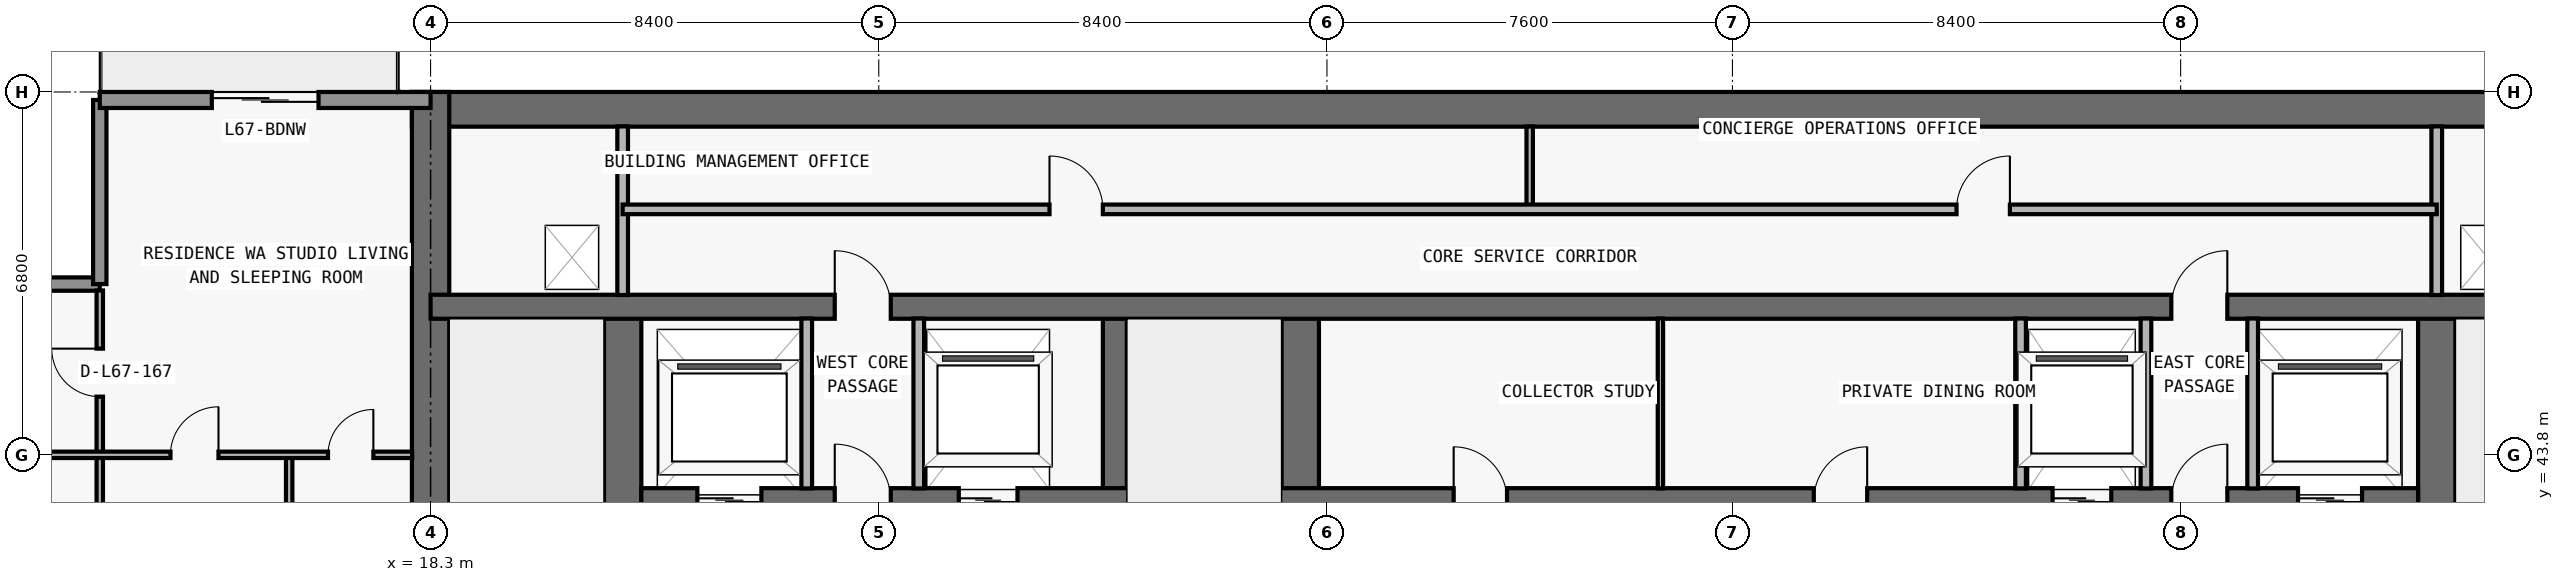
"""IFC4 building model, lengths in metres.
Left out: names, types, materials, properties, quantities, classifications, styles, units other than length and angle.
Written with IfcOpenShell. Run it as: python <this file> out.ifc"""

import sys

from ifc_helpers import new_model, si_unit, direction, frame, frame_2d, origin, place, context, subcontext, project, spatial, rectangle, extrude, element, fill, save


model = new_model("IFC4")
c1 = context("Model", 3, precision=1e-05, world=origin(), true_north=direction((0.0, 1.0)))
c2 = subcontext(c1, "Body", "Model", "MODEL_VIEW")
j1 = project(units=[si_unit("LENGTHUNIT", "METRE"), si_unit("PLANEANGLEUNIT", "RADIAN")], contexts=[c1])
p1 = place(None, origin())
s1 = spatial("IfcSite", under=j1, at=p1, CompositionType="ELEMENT")
p2 = place(p1, origin())
s2 = spatial("IfcBuilding", under=s1, at=p2, CompositionType="ELEMENT")
p3 = place(p2, frame((0.0, 0.0, 239.7)))
s3 = spatial("IfcBuildingStorey", under=s2, at=p3, CompositionType="ELEMENT", Elevation=239.7)
p4 = place(p3, frame((17.95, 50.275, 0.0), z_axis=(0.0, 0.0, 1.0), x_axis=(1.0, 0.0, 0.0)))
e1 = element("IfcWall", 1, at=p4, inside=s3, PredefinedType="SHEAR", context=c2, shape_type="SweptSolid", body=[
    extrude(rectangle(XDim=41.9, YDim=0.65, at=frame_2d((20.95, 0.0))), origin(), (0.0, 0.0, 1.0), 3.05),
])
p5 = place(p3, frame((18.3, 36.65, 0.0), z_axis=(0.0, 0.0, 1.0), x_axis=(0.0, 1.0, 0.0)))
e2 = element("IfcWall", 2, at=p5, inside=s3, PredefinedType="SHEAR", context=c2, shape_type="SweptSolid", body=[
    extrude(rectangle(XDim=13.95, YDim=0.7, at=frame_2d((6.975, 0.0))), origin(), (0.0, 0.0, 1.0), 3.05),
])
p6 = place(p3, frame((21.9, 37.0, 0.0), z_axis=(0.0, 0.0, 1.0), x_axis=(0.0, 1.0, 0.0)))
e3 = element("IfcWall", 3, at=p6, inside=s3, PredefinedType="SHEAR", context=c2, shape_type="SweptSolid", body=[
    extrude(rectangle(XDim=9.575, YDim=0.7, at=frame_2d((4.788, 0.0))), origin(), (0.0, 0.0, 1.0), 3.05),
])
p7 = place(p6, frame((0.55, 0.0, 0.0)))
e4 = element("IfcOpeningElement", 4, at=p7, cuts=e3, PredefinedType="OPENING", context=c2, shape_type="SweptSolid", body=[
    extrude(rectangle(XDim=1.1, YDim=2.15, at=frame_2d((0.55, 1.075))), frame((0.0, 0.36, 0.0), z_axis=(0.0, -1.0, 0.0), x_axis=(1.0, 0.0, 0.0)), (0.0, 0.0, 1.0), 0.72),
])
p8 = place(p3, frame((55.9, 37.0, 0.0), z_axis=(0.0, 0.0, 1.0), x_axis=(0.0, 1.0, 0.0)))
e5 = element("IfcWall", 5, at=p8, inside=s3, PredefinedType="SHEAR", context=c2, shape_type="SweptSolid", body=[
    extrude(rectangle(XDim=9.575, YDim=0.7, at=frame_2d((4.788, 0.0))), origin(), (0.0, 0.0, 1.0), 3.05),
])
p9 = place(p8, frame((0.55, 0.0, 0.0)))
e6 = element("IfcOpeningElement", 6, at=p9, cuts=e5, PredefinedType="OPENING", context=c2, shape_type="SweptSolid", body=[
    extrude(rectangle(XDim=1.1, YDim=2.15, at=frame_2d((0.55, 1.075))), frame((0.0, 0.36, 0.0), z_axis=(0.0, -1.0, 0.0), x_axis=(1.0, 0.0, 0.0)), (0.0, 0.0, 1.0), 0.72),
])
p10 = place(p3, frame((31.125, 37.0, 0.0), z_axis=(0.0, 0.0, 1.0), x_axis=(0.0, 1.0, 0.0)))
e7 = element("IfcWall", 7, at=p10, inside=s3, PredefinedType="SHEAR", context=c2, shape_type="SweptSolid", body=[
    extrude(rectangle(XDim=9.575, YDim=0.45, at=frame_2d((4.788, 0.0))), origin(), (0.0, 0.0, 1.0), 3.05),
])
p11 = place(p3, frame((34.6, 37.0, 0.0), z_axis=(0.0, 0.0, 1.0), x_axis=(0.0, 1.0, 0.0)))
e8 = element("IfcWall", 8, at=p11, inside=s3, PredefinedType="SHEAR", context=c2, shape_type="SweptSolid", body=[
    extrude(rectangle(XDim=9.575, YDim=0.7, at=frame_2d((4.788, 0.0))), origin(), (0.0, 0.0, 1.0), 3.05),
])
p12 = place(p3, frame((22.25, 42.95, 0.0), z_axis=(0.0, 0.0, 1.0), x_axis=(1.0, 0.0, 0.0)))
e9 = element("IfcWall", 9, at=p12, inside=s3, PredefinedType="SHEAR", context=c2, shape_type="SweptSolid", body=[
    extrude(rectangle(XDim=33.3, YDim=0.45, at=frame_2d((16.65, 0.0))), origin(), (0.0, 0.0, 1.0), 3.05),
])
p13 = place(p12, frame((1.05, 0.0, 0.0)))
e10 = element("IfcOpeningElement", 10, at=p13, cuts=e9, PredefinedType="OPENING", context=c2, shape_type="SweptSolid", body=[
    extrude(rectangle(XDim=1.2, YDim=2.2, at=frame_2d((0.6, 1.1))), frame((0.0, 0.235, 0.0), z_axis=(0.0, -1.0, 0.0), x_axis=(1.0, 0.0, 0.0)), (0.0, 0.0, 1.0), 0.47),
])
p14 = place(p12, frame((31.05, 0.0, 0.0)))
e11 = element("IfcOpeningElement", 11, at=p14, cuts=e9, PredefinedType="OPENING", context=c2, shape_type="SweptSolid", body=[
    extrude(rectangle(XDim=1.2, YDim=2.2, at=frame_2d((0.6, 1.1))), frame((0.0, 0.235, 0.0), z_axis=(0.0, -1.0, 0.0), x_axis=(1.0, 0.0, 0.0)), (0.0, 0.0, 1.0), 0.47),
])
p15 = place(p12, frame((26.45, 0.0, 0.0)))
e12 = element("IfcOpeningElement", 12, at=p15, cuts=e9, PredefinedType="OPENING", context=c2, shape_type="SweptSolid", body=[
    extrude(rectangle(XDim=1.1, YDim=2.2, at=frame_2d((0.55, 1.1))), frame((0.0, 0.235, 0.0), z_axis=(0.0, -1.0, 0.0), x_axis=(1.0, 0.0, 0.0)), (0.0, 0.0, 1.0), 0.47),
])
p16 = place(p12, frame((5.95, 0.0, 0.0)))
e13 = element("IfcOpeningElement", 13, at=p16, cuts=e9, PredefinedType="OPENING", context=c2, shape_type="SweptSolid", body=[
    extrude(rectangle(XDim=1.1, YDim=2.2, at=frame_2d((0.55, 1.1))), frame((0.0, 0.235, 0.0), z_axis=(0.0, -1.0, 0.0), x_axis=(1.0, 0.0, 0.0)), (0.0, 0.0, 1.0), 0.47),
])
p17 = place(p12, frame((3.625, 0.0, 0.0)))
e14 = element("IfcOpeningElement", 14, at=p17, cuts=e9, PredefinedType="OPENING", context=c2, shape_type="SweptSolid", body=[
    extrude(rectangle(XDim=1.05, YDim=2.15, at=frame_2d((0.525, 1.075))), frame((0.0, 0.235, 0.0), z_axis=(0.0, -1.0, 0.0), x_axis=(1.0, 0.0, 0.0)), (0.0, 0.0, 1.0), 0.47),
])
p18 = place(p12, frame((28.675, 0.0, 0.0)))
e15 = element("IfcOpeningElement", 15, at=p18, cuts=e9, PredefinedType="OPENING", context=c2, shape_type="SweptSolid", body=[
    extrude(rectangle(XDim=1.05, YDim=2.15, at=frame_2d((0.525, 1.075))), frame((0.0, 0.235, 0.0), z_axis=(0.0, -1.0, 0.0), x_axis=(1.0, 0.0, 0.0)), (0.0, 0.0, 1.0), 0.47),
])
p19 = place(p12, frame((15.225, 0.0, 0.0)))
e16 = element("IfcOpeningElement", 16, at=p19, cuts=e9, PredefinedType="OPENING", context=c2, shape_type="SweptSolid", body=[
    extrude(rectangle(XDim=1.0, YDim=2.2, at=frame_2d((0.5, 1.1))), frame((0.0, 0.235, 0.0), z_axis=(0.0, -1.0, 0.0), x_axis=(1.0, 0.0, 0.0)), (0.0, 0.0, 1.0), 0.47),
])
p20 = place(p12, frame((21.975, 0.0, 0.0)))
e17 = element("IfcOpeningElement", 17, at=p20, cuts=e9, PredefinedType="OPENING", context=c2, shape_type="SweptSolid", body=[
    extrude(rectangle(XDim=1.0, YDim=2.2, at=frame_2d((0.5, 1.1))), frame((0.0, 0.235, 0.0), z_axis=(0.0, -1.0, 0.0), x_axis=(1.0, 0.0, 0.0)), (0.0, 0.0, 1.0), 0.47),
])
p21 = place(p3, frame((18.3, 46.575, 0.0), z_axis=(0.0, 0.0, 1.0), x_axis=(1.0, 0.0, 0.0)))
e18 = element("IfcWall", 18, at=p21, inside=s3, PredefinedType="SHEAR", context=c2, shape_type="SweptSolid", body=[
    extrude(rectangle(XDim=41.2, YDim=0.45, at=frame_2d((20.6, 0.0))), origin(), (0.0, 0.0, 1.0), 3.05),
])
p22 = place(p21, frame((7.575, 0.0, 0.0)))
e19 = element("IfcOpeningElement", 19, at=p22, cuts=e18, PredefinedType="OPENING", context=c2, shape_type="SweptSolid", body=[
    extrude(rectangle(XDim=1.05, YDim=2.15, at=frame_2d((0.525, 1.075))), frame((0.0, 0.235, 0.0), z_axis=(0.0, -1.0, 0.0), x_axis=(1.0, 0.0, 0.0)), (0.0, 0.0, 1.0), 0.47),
])
p23 = place(p21, frame((32.625, 0.0, 0.0)))
e20 = element("IfcOpeningElement", 20, at=p23, cuts=e18, PredefinedType="OPENING", context=c2, shape_type="SweptSolid", body=[
    extrude(rectangle(XDim=1.05, YDim=2.15, at=frame_2d((0.525, 1.075))), frame((0.0, 0.235, 0.0), z_axis=(0.0, -1.0, 0.0), x_axis=(1.0, 0.0, 0.0)), (0.0, 0.0, 1.0), 0.47),
])
p24 = place(p3, frame((8.25, 47.0, 0.0), z_axis=(0.0, 0.0, 1.0), x_axis=(1.0, 0.0, 0.0)))
e21 = element("IfcWall", 21, at=p24, inside=s3, PredefinedType="ELEMENTEDWALL", context=c2, shape_type="SweptSolid", body=[
    extrude(rectangle(XDim=3.85, YDim=0.25, at=frame_2d((1.925, 0.0))), origin(), (0.0, 0.0, 1.0), 3.05),
])
p25 = place(p3, frame((12.1, 47.0, 0.0), z_axis=(0.0, 0.0, 1.0), x_axis=(0.0, 1.0, 0.0)))
e22 = element("IfcWall", 22, at=p25, inside=s3, PredefinedType="ELEMENTEDWALL", context=c2, shape_type="SweptSolid", body=[
    extrude(rectangle(XDim=3.45, YDim=0.25, at=frame_2d((1.725, 0.0))), origin(), (0.0, 0.0, 1.0), 3.05),
])
p26 = place(p3, frame((12.1, 50.45, 0.0), z_axis=(0.0, 0.0, 1.0), x_axis=(1.0, 0.0, 0.0)))
e23 = element("IfcWall", 23, at=p26, inside=s3, PredefinedType="STANDARD", context=c2, shape_type="SweptSolid", body=[
    extrude(rectangle(XDim=6.2, YDim=0.3, at=frame_2d((3.1, 0.0))), origin(), (0.0, 0.0, 1.0), 3.05),
])
p27 = place(p26, frame((2.1, 0.0, 0.0)))
e24 = element("IfcOpeningElement", 24, at=p27, cuts=e23, PredefinedType="OPENING", context=c2, shape_type="SweptSolid", body=[
    extrude(rectangle(XDim=2.0, YDim=2.3, at=frame_2d((1.0, 1.15))), frame((0.0, 0.16, 0.0), z_axis=(0.0, -1.0, 0.0), x_axis=(1.0, 0.0, 0.0)), (0.0, 0.0, 1.0), 0.32),
])
p28 = place(p3, frame((12.1, 37.005, 0.0), z_axis=(0.0, 0.0, 1.0), x_axis=(0.0, 1.0, 0.0)))
e25 = element("IfcWall", 25, at=p28, inside=s3, PredefinedType="PARTITIONING", context=c2, shape_type="SweptSolid", body=[
    extrude(rectangle(XDim=9.875, YDim=0.12, at=frame_2d((4.938, 0.0))), origin(), (0.0, 0.0, 1.0), 3.05),
])
p29 = place(p28, frame((2.948, 0.0, 0.0)))
e26 = element("IfcOpeningElement", 26, at=p29, cuts=e25, PredefinedType="OPENING", context=c2, shape_type="SweptSolid", body=[
    extrude(rectangle(XDim=0.9, YDim=2.15, at=frame_2d((0.45, 1.075))), frame((0.0, 0.07, 0.0), z_axis=(0.0, -1.0, 0.0), x_axis=(1.0, 0.0, 0.0)), (0.0, 0.0, 1.0), 0.14),
])
p30 = place(p28, frame((7.885, 0.0, 0.0)))
e27 = element("IfcOpeningElement", 27, at=p30, cuts=e25, PredefinedType="OPENING", context=c2, shape_type="SweptSolid", body=[
    extrude(rectangle(XDim=0.9, YDim=2.15, at=frame_2d((0.45, 1.075))), frame((0.0, 0.07, 0.0), z_axis=(0.0, -1.0, 0.0), x_axis=(1.0, 0.0, 0.0)), (0.0, 0.0, 1.0), 0.14),
])
p31 = place(p3, frame((15.65, 37.0, 0.0), z_axis=(0.0, 0.0, 1.0), x_axis=(0.0, 1.0, 0.0)))
e28 = element("IfcWall", 28, at=p31, inside=s3, PredefinedType="PARTITIONING", context=c2, shape_type="SweptSolid", body=[
    extrude(rectangle(XDim=6.8, YDim=0.12, at=frame_2d((3.4, 0.0))), origin(), (0.0, 0.0, 1.0), 3.05),
])
p32 = place(p31, frame((1.207, 0.0, 0.0)))
e29 = element("IfcOpeningElement", 29, at=p32, cuts=e28, PredefinedType="OPENING", context=c2, shape_type="SweptSolid", body=[
    extrude(rectangle(XDim=0.85, YDim=2.1, at=frame_2d((0.425, 1.05))), frame((0.0, 0.07, 0.0), z_axis=(0.0, -1.0, 0.0), x_axis=(1.0, 0.0, 0.0)), (0.0, 0.0, 1.0), 0.14),
])
p33 = place(p3, frame((21.9, 46.795, 0.0), z_axis=(0.0, 0.0, 1.0), x_axis=(0.0, 1.0, 0.0)))
e30 = element("IfcWall", 30, at=p33, inside=s3, PredefinedType="PARTITIONING", context=c2, shape_type="SweptSolid", body=[
    extrude(rectangle(XDim=3.16, YDim=0.2, at=frame_2d((1.58, 0.0))), origin(), (0.0, 0.0, 1.0), 3.05),
])
for number, where, z_axis, x_axis in (
    (31, (25.35, 43.17, 0.0), (0.0, 0.0, 1.0), (0.0, 1.0, 0.0)),
    (32, (27.45, 43.17, 0.0), (0.0, 0.0, 1.0), (0.0, 1.0, 0.0)),
):
    element("IfcWall", number, at=place(p3, frame(where, z_axis=z_axis, x_axis=x_axis)), inside=s3, PredefinedType="PARTITIONING", context=c2, shape_type="SweptSolid", body=[
        extrude(rectangle(XDim=3.185, YDim=0.2, at=frame_2d((1.593, 0.0))), origin(), (0.0, 0.0, 1.0), 3.05),
    ])
p34 = place(p3, frame((38.9, 48.4, 0.0), z_axis=(0.0, 0.0, 1.0), x_axis=(0.0, 1.0, 0.0)))
e33 = element("IfcWall", 33, at=p34, inside=s3, PredefinedType="PARTITIONING", context=c2, shape_type="SweptSolid", body=[
    extrude(rectangle(XDim=1.555, YDim=0.12, at=frame_2d((0.778, 0.0))), origin(), (0.0, 0.0, 1.0), 3.05),
])
p35 = place(p3, frame((41.35, 43.17, 0.0), z_axis=(0.0, 0.0, 1.0), x_axis=(0.0, 1.0, 0.0)))
e34 = element("IfcWall", 34, at=p35, inside=s3, PredefinedType="MOVABLE", context=c2, shape_type="SweptSolid", body=[
    extrude(rectangle(XDim=3.185, YDim=0.1, at=frame_2d((1.593, 0.0))), origin(), (0.0, 0.0, 1.0), 3.05),
])
for number, where, z_axis, x_axis in (
    (35, (48.1, 43.17, 0.0), (0.0, 0.0, 1.0), (0.0, 1.0, 0.0)),
    (36, (50.45, 43.17, 0.0), (0.0, 0.0, 1.0), (0.0, 1.0, 0.0)),
    (37, (52.45, 43.17, 0.0), (0.0, 0.0, 1.0), (0.0, 1.0, 0.0)),
):
    element("IfcWall", number, at=place(p3, frame(where, z_axis=z_axis, x_axis=x_axis)), inside=s3, PredefinedType="PARTITIONING", context=c2, shape_type="SweptSolid", body=[
        extrude(rectangle(XDim=3.185, YDim=0.2, at=frame_2d((1.593, 0.0))), origin(), (0.0, 0.0, 1.0), 3.05),
    ])
p36 = place(p3, frame((55.9, 46.795, 0.0), z_axis=(0.0, 0.0, 1.0), x_axis=(0.0, 1.0, 0.0)))
e38 = element("IfcWall", 38, at=p36, inside=s3, PredefinedType="PARTITIONING", context=c2, shape_type="SweptSolid", body=[
    extrude(rectangle(XDim=3.16, YDim=0.2, at=frame_2d((1.58, 0.0))), origin(), (0.0, 0.0, 1.0), 3.05),
])
p37 = place(p3, frame((8.395, 43.8, 0.0), z_axis=(0.0, 0.0, 1.0), x_axis=(1.0, 0.0, 0.0)))
e39 = element("IfcWall", 39, at=p37, inside=s3, PredefinedType="PARTITIONING", context=c2, shape_type="SweptSolid", body=[
    extrude(rectangle(XDim=9.56, YDim=0.12, at=frame_2d((4.78, 0.0))), origin(), (0.0, 0.0, 1.0), 2.418),
])
p38 = place(p37, frame((5.03, 0.0, 0.0)))
e40 = element("IfcOpeningElement", 40, at=p38, cuts=e39, PredefinedType="OPENING", context=c2, shape_type="SweptSolid", body=[
    extrude(rectangle(XDim=0.9, YDim=2.15, at=frame_2d((0.45, 1.075))), frame((0.0, 0.07, 0.0), z_axis=(0.0, -1.0, 0.0), x_axis=(1.0, 0.0, 0.0)), (0.0, 0.0, 1.0), 0.14),
])
p39 = place(p37, frame((7.982, 0.0, 0.0)))
e41 = element("IfcOpeningElement", 41, at=p39, cuts=e39, PredefinedType="OPENING", context=c2, shape_type="SweptSolid", body=[
    extrude(rectangle(XDim=0.85, YDim=2.1, at=frame_2d((0.425, 1.05))), frame((0.0, 0.07, 0.0), z_axis=(0.0, -1.0, 0.0), x_axis=(1.0, 0.0, 0.0)), (0.0, 0.0, 1.0), 0.14),
])
p40 = place(p3, frame((21.9, 48.4, 0.0), z_axis=(0.0, 0.0, 1.0), x_axis=(1.0, 0.0, 0.0)))
e42 = element("IfcWall", 42, at=p40, inside=s3, PredefinedType="PARTITIONING", context=c2, shape_type="SweptSolid", body=[
    extrude(rectangle(XDim=34.0, YDim=0.18, at=frame_2d((17.0, 0.0))), origin(), (0.0, 0.0, 1.0), 3.05),
])
p41 = place(p40, frame((8.0, 0.0, 0.0)))
e43 = element("IfcOpeningElement", 43, at=p41, cuts=e42, PredefinedType="OPENING", context=c2, shape_type="SweptSolid", body=[
    extrude(rectangle(XDim=1.0, YDim=2.2, at=frame_2d((0.5, 1.1))), frame((0.0, 0.1, 0.0), z_axis=(0.0, -1.0, 0.0), x_axis=(1.0, 0.0, 0.0)), (0.0, 0.0, 1.0), 0.2),
])
p42 = place(p40, frame((25.0, 0.0, 0.0)))
e44 = element("IfcOpeningElement", 44, at=p42, cuts=e42, PredefinedType="OPENING", context=c2, shape_type="SweptSolid", body=[
    extrude(rectangle(XDim=1.0, YDim=2.2, at=frame_2d((0.5, 1.1))), frame((0.0, 0.1, 0.0), z_axis=(0.0, -1.0, 0.0), x_axis=(1.0, 0.0, 0.0)), (0.0, 0.0, 1.0), 0.2),
])
p43 = place(p27, origin())
e45 = element("IfcDoor", 45, at=p43, inside=s3, OperationType="DOUBLE_DOOR_SLIDING", PredefinedType="DOOR", context=c2, shape_type="SweptSolid", body=[
    extrude(rectangle(XDim=2.0, YDim=2.3, at=frame_2d((1.0, 1.15))), frame((0.0, 0.025, 0.0), z_axis=(0.0, -1.0, 0.0), x_axis=(1.0, 0.0, 0.0)), (0.0, 0.0, 1.0), 0.05),
])
fill(e24, e45)
p44 = place(p13, origin())
e46 = element("IfcDoor", 46, at=p44, inside=s3, OperationType="DOUBLE_DOOR_SLIDING", PredefinedType="DOOR", context=c2, shape_type="SweptSolid", body=[
    extrude(rectangle(XDim=1.2, YDim=2.2, at=frame_2d((0.6, 1.1))), frame((0.0, 0.025, 0.0), z_axis=(0.0, -1.0, 0.0), x_axis=(1.0, 0.0, 0.0)), (0.0, 0.0, 1.0), 0.05),
])
fill(e10, e46)
p45 = place(p14, origin())
e47 = element("IfcDoor", 47, at=p45, inside=s3, OperationType="DOUBLE_DOOR_SLIDING", PredefinedType="DOOR", context=c2, shape_type="SweptSolid", body=[
    extrude(rectangle(XDim=1.2, YDim=2.2, at=frame_2d((0.6, 1.1))), frame((0.0, 0.025, 0.0), z_axis=(0.0, -1.0, 0.0), x_axis=(1.0, 0.0, 0.0)), (0.0, 0.0, 1.0), 0.05),
])
fill(e11, e47)
p46 = place(p15, origin())
e48 = element("IfcDoor", 48, at=p46, inside=s3, OperationType="DOUBLE_DOOR_SLIDING", PredefinedType="DOOR", context=c2, shape_type="SweptSolid", body=[
    extrude(rectangle(XDim=1.1, YDim=2.2, at=frame_2d((0.55, 1.1))), frame((0.0, 0.025, 0.0), z_axis=(0.0, -1.0, 0.0), x_axis=(1.0, 0.0, 0.0)), (0.0, 0.0, 1.0), 0.05),
])
fill(e12, e48)
p47 = place(p16, origin())
e49 = element("IfcDoor", 49, at=p47, inside=s3, OperationType="DOUBLE_DOOR_SLIDING", PredefinedType="DOOR", context=c2, shape_type="SweptSolid", body=[
    extrude(rectangle(XDim=1.1, YDim=2.2, at=frame_2d((0.55, 1.1))), frame((0.0, 0.025, 0.0), z_axis=(0.0, -1.0, 0.0), x_axis=(1.0, 0.0, 0.0)), (0.0, 0.0, 1.0), 0.05),
])
fill(e13, e49)
p48 = place(p17, origin())
e50 = element("IfcDoor", 50, at=p48, inside=s3, OperationType="SINGLE_SWING_LEFT", PredefinedType="DOOR", context=c2, shape_type="SweptSolid", body=[
    extrude(rectangle(XDim=1.05, YDim=2.15, at=frame_2d((0.525, 1.075))), frame((0.0, 0.025, 0.0), z_axis=(0.0, -1.0, 0.0), x_axis=(1.0, 0.0, 0.0)), (0.0, 0.0, 1.0), 0.05),
])
fill(e14, e50)
p49 = place(p18, origin())
e51 = element("IfcDoor", 51, at=p49, inside=s3, OperationType="SINGLE_SWING_RIGHT", PredefinedType="DOOR", context=c2, shape_type="SweptSolid", body=[
    extrude(rectangle(XDim=1.05, YDim=2.15, at=frame_2d((0.525, 1.075))), frame((0.0, 0.025, 0.0), z_axis=(0.0, -1.0, 0.0), x_axis=(1.0, 0.0, 0.0)), (0.0, 0.0, 1.0), 0.05),
])
fill(e15, e51)
p50 = place(p19, origin())
e52 = element("IfcDoor", 52, at=p50, inside=s3, OperationType="SINGLE_SWING_LEFT", PredefinedType="DOOR", context=c2, shape_type="SweptSolid", body=[
    extrude(rectangle(XDim=1.0, YDim=2.2, at=frame_2d((0.5, 1.1))), frame((0.0, 0.025, 0.0), z_axis=(0.0, -1.0, 0.0), x_axis=(1.0, 0.0, 0.0)), (0.0, 0.0, 1.0), 0.05),
])
fill(e16, e52)
p51 = place(p20, origin())
e53 = element("IfcDoor", 53, at=p51, inside=s3, OperationType="SINGLE_SWING_RIGHT", PredefinedType="DOOR", context=c2, shape_type="SweptSolid", body=[
    extrude(rectangle(XDim=1.0, YDim=2.2, at=frame_2d((0.5, 1.1))), frame((0.0, 0.025, 0.0), z_axis=(0.0, -1.0, 0.0), x_axis=(1.0, 0.0, 0.0)), (0.0, 0.0, 1.0), 0.05),
])
fill(e17, e53)
p52 = place(p22, origin())
e54 = element("IfcDoor", 54, at=p52, inside=s3, OperationType="SINGLE_SWING_LEFT", PredefinedType="DOOR", context=c2, shape_type="SweptSolid", body=[
    extrude(rectangle(XDim=1.05, YDim=2.15, at=frame_2d((0.525, 1.075))), frame((0.0, 0.025, 0.0), z_axis=(0.0, -1.0, 0.0), x_axis=(1.0, 0.0, 0.0)), (0.0, 0.0, 1.0), 0.05),
])
fill(e19, e54)
p53 = place(p23, origin())
e55 = element("IfcDoor", 55, at=p53, inside=s3, OperationType="SINGLE_SWING_RIGHT", PredefinedType="DOOR", context=c2, shape_type="SweptSolid", body=[
    extrude(rectangle(XDim=1.05, YDim=2.15, at=frame_2d((0.525, 1.075))), frame((0.0, 0.025, 0.0), z_axis=(0.0, -1.0, 0.0), x_axis=(1.0, 0.0, 0.0)), (0.0, 0.0, 1.0), 0.05),
])
fill(e20, e55)
p54 = place(p41, origin())
e56 = element("IfcDoor", 56, at=p54, inside=s3, OperationType="SINGLE_SWING_LEFT", PredefinedType="DOOR", context=c2, shape_type="SweptSolid", body=[
    extrude(rectangle(XDim=1.0, YDim=2.2, at=frame_2d((0.5, 1.1))), frame((0.0, 0.025, 0.0), z_axis=(0.0, -1.0, 0.0), x_axis=(1.0, 0.0, 0.0)), (0.0, 0.0, 1.0), 0.05),
])
fill(e43, e56)
p55 = place(p42, origin())
e57 = element("IfcDoor", 57, at=p55, inside=s3, OperationType="SINGLE_SWING_RIGHT", PredefinedType="DOOR", context=c2, shape_type="SweptSolid", body=[
    extrude(rectangle(XDim=1.0, YDim=2.2, at=frame_2d((0.5, 1.1))), frame((0.0, 0.025, 0.0), z_axis=(0.0, -1.0, 0.0), x_axis=(1.0, 0.0, 0.0)), (0.0, 0.0, 1.0), 0.05),
])
fill(e44, e57)
p56 = place(p38, origin())
e58 = element("IfcDoor", 58, at=p56, inside=s3, OperationType="SINGLE_SWING_RIGHT", PredefinedType="DOOR", context=c2, shape_type="SweptSolid", body=[
    extrude(rectangle(XDim=0.9, YDim=2.15, at=frame_2d((0.45, 1.075))), frame((0.0, 0.025, 0.0), z_axis=(0.0, -1.0, 0.0), x_axis=(1.0, 0.0, 0.0)), (0.0, 0.0, 1.0), 0.05),
])
fill(e40, e58)
p57 = place(p39, origin())
e59 = element("IfcDoor", 59, at=p57, inside=s3, OperationType="SINGLE_SWING_RIGHT", PredefinedType="DOOR", context=c2, shape_type="SweptSolid", body=[
    extrude(rectangle(XDim=0.85, YDim=2.1, at=frame_2d((0.425, 1.05))), frame((0.0, 0.025, 0.0), z_axis=(0.0, -1.0, 0.0), x_axis=(1.0, 0.0, 0.0)), (0.0, 0.0, 1.0), 0.05),
])
fill(e41, e59)
p58 = place(p30, origin())
e60 = element("IfcDoor", 60, at=p58, inside=s3, OperationType="SINGLE_SWING_RIGHT", PredefinedType="DOOR", context=c2, shape_type="SweptSolid", body=[
    extrude(rectangle(XDim=0.9, YDim=2.15, at=frame_2d((0.45, 1.075))), frame((0.0, 0.025, 0.0), z_axis=(0.0, -1.0, 0.0), x_axis=(1.0, 0.0, 0.0)), (0.0, 0.0, 1.0), 0.05),
])
fill(e27, e60)
save(model, sys.argv[1])
